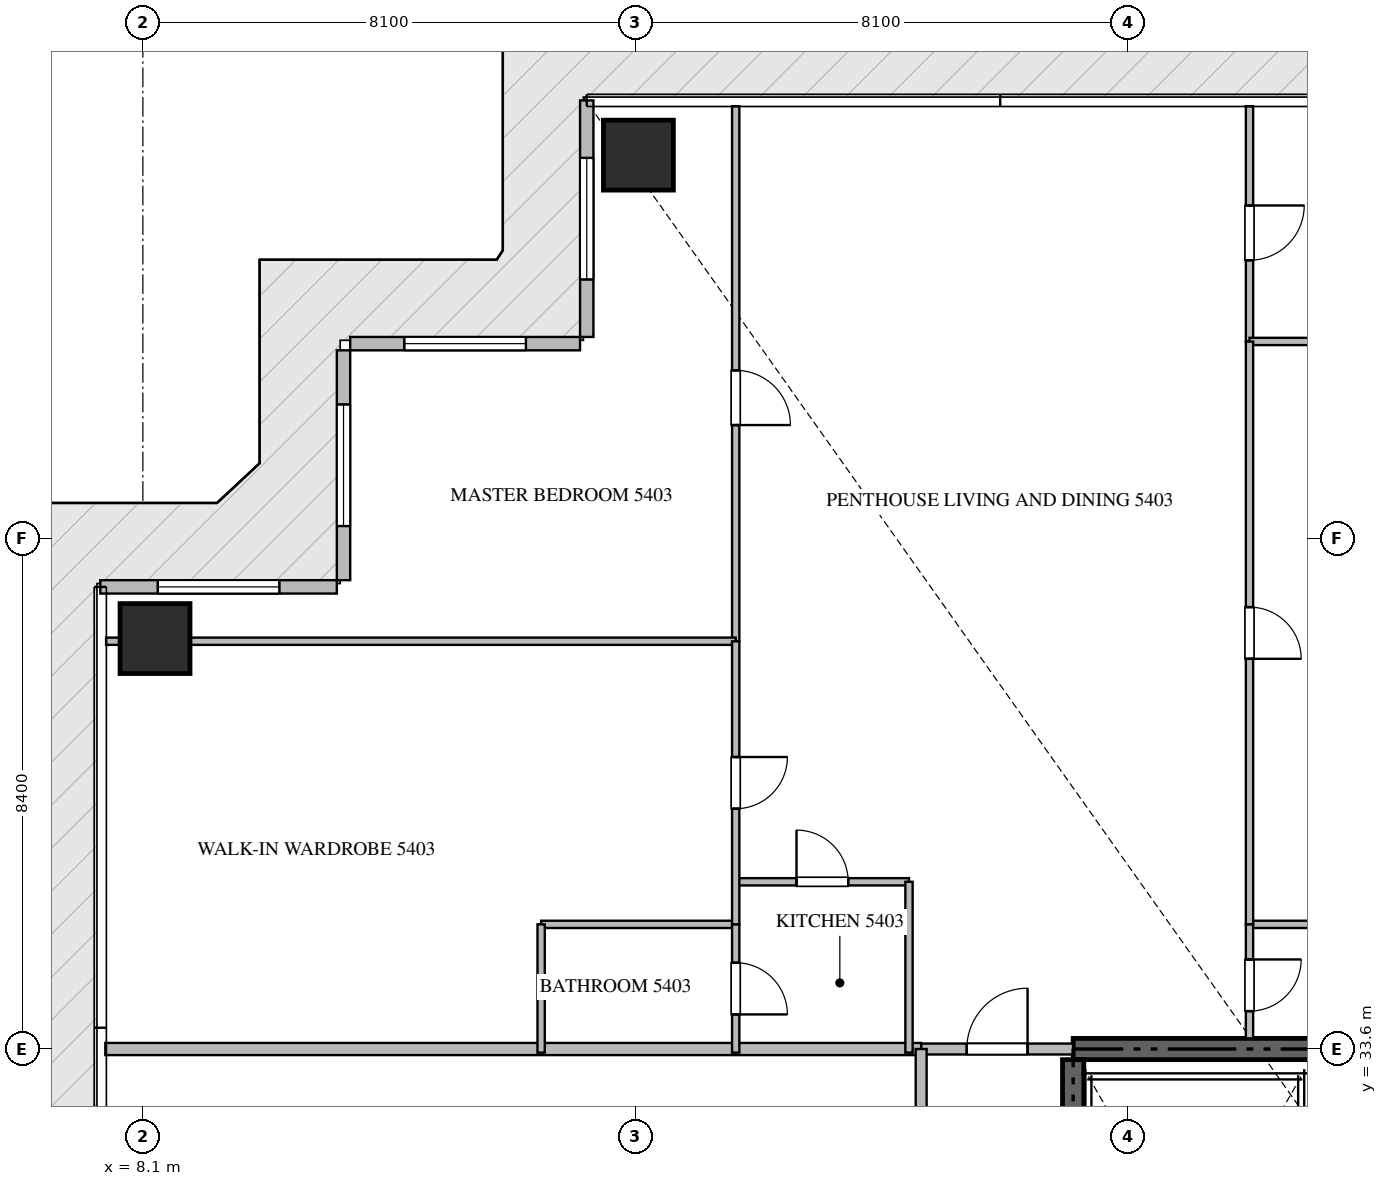
"""IFC4 building model, lengths in metres.
Left out: names, types, materials, properties, quantities, classifications, styles, units other than length and angle.
Written with IfcOpenShell. Run it as: python <this file> out.ifc"""

import sys

from ifc_helpers import new_model, si_unit, direction, frame, frame_2d, origin, origin_2d, place, context, subcontext, project, spatial, rectangle, extrude, source, transform, mapped, element, fill, save


model = new_model("IFC4")
c1 = context("Model", 3, precision=1e-05, world=origin(), true_north=direction((0.0, 1.0)))
c2 = subcontext(c1, "Body", "Model", "MODEL_VIEW")
j1 = project(units=[si_unit("LENGTHUNIT", "METRE"), si_unit("PLANEANGLEUNIT", "RADIAN")], contexts=[c1])
p1 = place(None, origin())
s1 = spatial("IfcSite", under=j1, at=p1, CompositionType="ELEMENT")
p2 = place(p1, origin())
s2 = spatial("IfcBuilding", under=s1, at=p2, CompositionType="ELEMENT")
p3 = place(p2, frame((0.0, 0.0, 218.15)))
s3 = spatial("IfcBuildingStorey", under=s2, at=p3, CompositionType="ELEMENT", Elevation=218.15)
p4 = place(p3, frame((41.4, 33.6, -0.26), z_axis=(0.0, 0.0, 1.0), x_axis=(-1.0, 0.0, 0.0)))
e1 = element("IfcWall", 1, at=p4, inside=s3, PredefinedType="SHEAR", context=c2, shape_type="SweptSolid", body=[
    extrude(rectangle(XDim=18.0, YDim=0.35, at=frame_2d((9.0, 0.0))), origin(), (0.0, 0.0, 1.0), 3.848),
])
p5 = place(p3, frame((23.4, 24.25, -0.26), z_axis=(0.0, 0.0, 1.0), x_axis=(0.0, 1.0, 0.0)))
e2 = element("IfcWall", 2, at=p5, inside=s3, PredefinedType="SHEAR", context=c2, shape_type="SweptSolid", body=[
    extrude(rectangle(XDim=9.175, YDim=0.35, at=frame_2d((4.587, 0.0))), origin(), (0.0, 0.0, 1.0), 3.848),
])
m1 = source(origin(), c2, "Body", "SweptSolid", [
    extrude(rectangle(XDim=1.15, YDim=1.15, at=origin_2d()), origin(), (0.0, 0.0, 1.0), 3.85),
])
for number, where, z_axis, x_axis in (
    (3, (16.25, 48.3, -0.26), (0.0, 0.0, 1.0), (1.0, 0.0, 0.0)),
    (4, (8.3, 40.35, -0.26), (0.0, 0.0, 1.0), (1.0, 0.0, 0.0)),
):
    element("IfcColumn", number, at=place(p3, frame(where, z_axis=z_axis, x_axis=x_axis)), inside=s3, PredefinedType="COLUMN", context=c2, shape_type="MappedRepresentation", body=[
        mapped(m1, transform((0.0, 0.0, 0.0), scale=1.0)),
    ])
p6 = place(p3, frame((15.4, 49.2, 0.0), z_axis=(0.0, 0.0, 1.0), x_axis=(0.0, -1.0, 0.0)))
e5 = element("IfcWall", 5, at=p6, inside=s3, PredefinedType="ELEMENTEDWALL", context=c2, shape_type="SweptSolid", body=[
    extrude(rectangle(XDim=3.89, YDim=0.22, at=frame_2d((1.945, 0.0))), origin(), (0.0, 0.0, 1.0), 3.575),
])
p7 = place(p6, frame((0.945, 0.0, 0.65)))
e6 = element("IfcOpeningElement", 6, at=p7, cuts=e5, PredefinedType="OPENING", context=c2, shape_type="SweptSolid", body=[
    extrude(rectangle(XDim=2.0, YDim=2.2, at=frame_2d((1.0, 1.1))), frame((0.0, 0.12, 0.0), z_axis=(0.0, -1.0, 0.0), x_axis=(1.0, 0.0, 0.0)), (0.0, 0.0, 1.0), 0.24),
])
p8 = place(p3, frame((15.29, 45.2, 0.0), z_axis=(0.0, 0.0, 1.0), x_axis=(-1.0, 0.0, 0.0)))
e7 = element("IfcWall", 7, at=p8, inside=s3, PredefinedType="ELEMENTEDWALL", context=c2, shape_type="SweptSolid", body=[
    extrude(rectangle(XDim=3.78, YDim=0.22, at=frame_2d((1.89, 0.0))), origin(), (0.0, 0.0, 1.0), 3.575),
])
p9 = place(p8, frame((0.89, 0.0, 0.65)))
e8 = element("IfcOpeningElement", 8, at=p9, cuts=e7, PredefinedType="OPENING", context=c2, shape_type="SweptSolid", body=[
    extrude(rectangle(XDim=2.0, YDim=2.2, at=frame_2d((1.0, 1.1))), frame((0.0, 0.12, 0.0), z_axis=(0.0, -1.0, 0.0), x_axis=(1.0, 0.0, 0.0)), (0.0, 0.0, 1.0), 0.24),
])
p10 = place(p3, frame((11.4, 45.09, 0.0), z_axis=(0.0, 0.0, 1.0), x_axis=(0.0, -1.0, 0.0)))
e9 = element("IfcWall", 9, at=p10, inside=s3, PredefinedType="ELEMENTEDWALL", context=c2, shape_type="SweptSolid", body=[
    extrude(rectangle(XDim=3.78, YDim=0.22, at=frame_2d((1.89, 0.0))), origin(), (0.0, 0.0, 1.0), 3.575),
])
p11 = place(p10, frame((0.89, 0.0, 0.65)))
e10 = element("IfcOpeningElement", 10, at=p11, cuts=e9, PredefinedType="OPENING", context=c2, shape_type="SweptSolid", body=[
    extrude(rectangle(XDim=2.0, YDim=2.2, at=frame_2d((1.0, 1.1))), frame((0.0, 0.12, 0.0), z_axis=(0.0, -1.0, 0.0), x_axis=(1.0, 0.0, 0.0)), (0.0, 0.0, 1.0), 0.24),
])
p12 = place(p3, frame((11.29, 41.2, 0.0), z_axis=(0.0, 0.0, 1.0), x_axis=(-1.0, 0.0, 0.0)))
e11 = element("IfcWall", 11, at=p12, inside=s3, PredefinedType="ELEMENTEDWALL", context=c2, shape_type="SweptSolid", body=[
    extrude(rectangle(XDim=3.89, YDim=0.22, at=frame_2d((1.945, 0.0))), origin(), (0.0, 0.0, 1.0), 3.575),
])
p13 = place(p12, frame((0.945, 0.0, 0.65)))
e12 = element("IfcOpeningElement", 12, at=p13, cuts=e11, PredefinedType="OPENING", context=c2, shape_type="SweptSolid", body=[
    extrude(rectangle(XDim=2.0, YDim=2.2, at=frame_2d((1.0, 1.1))), frame((0.0, 0.12, 0.0), z_axis=(0.0, -1.0, 0.0), x_axis=(1.0, 0.0, 0.0)), (0.0, 0.0, 1.0), 0.24),
])
p14 = place(p3, frame((7.482, 33.6, 0.0), z_axis=(0.0, 0.0, 1.0), x_axis=(1.0, 0.0, 0.0)))
e13 = element("IfcWall", 13, at=p14, inside=s3, PredefinedType="PARTITIONING", context=c2, shape_type="SweptSolid", body=[
    extrude(rectangle(XDim=13.418, YDim=0.2, at=frame_2d((6.709, 0.0))), origin(), (0.0, 0.0, 1.0), 3.59),
])
p15 = place(p3, frame((20.902, 33.6, 0.0), z_axis=(0.0, 0.0, 1.0), x_axis=(1.0, 0.0, 0.0)))
e14 = element("IfcWall", 14, at=p15, inside=s3, PredefinedType="PARTITIONING", context=c2, shape_type="SweptSolid", body=[
    extrude(rectangle(XDim=2.496, YDim=0.18, at=frame_2d((1.248, 0.0))), origin(), (0.0, 0.0, 1.0), 3.59),
])
p16 = place(p15, frame((0.748, 0.0, 0.0)))
e15 = element("IfcOpeningElement", 15, at=p16, cuts=e14, PredefinedType="OPENING", context=c2, shape_type="SweptSolid", body=[
    extrude(rectangle(XDim=1.0, YDim=2.15, at=frame_2d((0.5, 1.075))), frame((0.0, 0.1, 0.0), z_axis=(0.0, -1.0, 0.0), x_axis=(1.0, 0.0, 0.0)), (0.0, 0.0, 1.0), 0.2),
])
p17 = place(p3, frame((20.9, 16.8, 0.0), z_axis=(0.0, 0.0, 1.0), x_axis=(0.0, 1.0, 0.0)))
e16 = element("IfcWall", 16, at=p17, inside=s3, PredefinedType="PARTITIONING", context=c2, shape_type="SweptSolid", body=[
    extrude(rectangle(XDim=16.8, YDim=0.18, at=frame_2d((8.4, 0.0))), origin(), (0.0, 0.0, 1.0), 3.59),
])
p18 = place(p17, frame((14.5, 0.0, 0.0)))
e17 = element("IfcOpeningElement", 17, at=p18, cuts=e16, PredefinedType="OPENING", context=c2, shape_type="SweptSolid", body=[
    extrude(rectangle(XDim=1.0, YDim=2.15, at=frame_2d((0.5, 1.075))), frame((0.0, 0.1, 0.0), z_axis=(0.0, -1.0, 0.0), x_axis=(1.0, 0.0, 0.0)), (0.0, 0.0, 1.0), 0.2),
])
p19 = place(p3, frame((17.85, 36.35, 0.0), z_axis=(0.0, 0.0, 1.0), x_axis=(1.0, 0.0, 0.0)))
e18 = element("IfcWall", 18, at=p19, inside=s3, PredefinedType="PARTITIONING", context=c2, shape_type="SweptSolid", body=[
    extrude(rectangle(XDim=2.85, YDim=0.12, at=frame_2d((1.425, 0.0))), origin(), (0.0, 0.0, 1.0), 3.59),
])
p20 = place(p19, frame((1.0, 0.0, 0.0)))
e19 = element("IfcOpeningElement", 19, at=p20, cuts=e18, PredefinedType="OPENING", context=c2, shape_type="SweptSolid", body=[
    extrude(rectangle(XDim=0.85, YDim=2.1, at=frame_2d((0.425, 1.05))), frame((0.0, 0.07, 0.0), z_axis=(0.0, -1.0, 0.0), x_axis=(1.0, 0.0, 0.0)), (0.0, 0.0, 1.0), 0.14),
])
p21 = place(p3, frame((20.7, 36.35, 0.0), z_axis=(0.0, 0.0, 1.0), x_axis=(0.0, -1.0, 0.0)))
e20 = element("IfcWall", 20, at=p21, inside=s3, PredefinedType="PARTITIONING", context=c2, shape_type="SweptSolid", body=[
    extrude(rectangle(XDim=2.81, YDim=0.12, at=frame_2d((1.405, 0.0))), origin(), (0.0, 0.0, 1.0), 3.59),
])
p22 = place(p3, frame((17.85, 49.105, 0.0), z_axis=(0.0, 0.0, 1.0), x_axis=(0.0, -1.0, 0.0)))
e21 = element("IfcWall", 21, at=p22, inside=s3, PredefinedType="PARTITIONING", context=c2, shape_type="SweptSolid", body=[
    extrude(rectangle(XDim=8.799, YDim=0.12, at=frame_2d((4.399, 0.0))), origin(), (0.0, 0.0, 1.0), 3.59),
])
p23 = place(p22, frame((4.344, 0.0, 0.0)))
e22 = element("IfcOpeningElement", 22, at=p23, cuts=e21, PredefinedType="OPENING", context=c2, shape_type="SweptSolid", body=[
    extrude(rectangle(XDim=0.9, YDim=2.1, at=frame_2d((0.45, 1.05))), frame((0.0, 0.07, 0.0), z_axis=(0.0, -1.0, 0.0), x_axis=(1.0, 0.0, 0.0)), (0.0, 0.0, 1.0), 0.14),
])
p24 = place(p3, frame((7.495, 40.306, 0.0), z_axis=(0.0, 0.0, 1.0), x_axis=(1.0, 0.0, 0.0)))
e23 = element("IfcWall", 23, at=p24, inside=s3, PredefinedType="PARTITIONING", context=c2, shape_type="SweptSolid", body=[
    extrude(rectangle(XDim=10.355, YDim=0.12, at=frame_2d((5.177, 0.0))), origin(), (0.0, 0.0, 1.0), 3.122),
])
p25 = place(p3, frame((14.65, 35.65, 0.0), z_axis=(0.0, 0.0, 1.0), x_axis=(1.0, 0.0, 0.0)))
e24 = element("IfcWall", 24, at=p25, inside=s3, PredefinedType="PARTITIONING", context=c2, shape_type="SweptSolid", body=[
    extrude(rectangle(XDim=3.2, YDim=0.12, at=frame_2d((1.6, 0.0))), origin(), (0.0, 0.0, 1.0), 3.59),
])
p26 = place(p3, frame((14.65, 35.65, 0.0), z_axis=(0.0, 0.0, 1.0), x_axis=(0.0, -1.0, 0.0)))
e25 = element("IfcWall", 25, at=p26, inside=s3, PredefinedType="PARTITIONING", context=c2, shape_type="SweptSolid", body=[
    extrude(rectangle(XDim=2.11, YDim=0.12, at=frame_2d((1.055, 0.0))), origin(), (0.0, 0.0, 1.0), 3.59),
])
p27 = place(p3, frame((17.85, 40.304, 0.0), z_axis=(0.0, 0.0, 1.0), x_axis=(0.0, -1.0, 0.0)))
e26 = element("IfcWall", 26, at=p27, inside=s3, PredefinedType="PARTITIONING", context=c2, shape_type="SweptSolid", body=[
    extrude(rectangle(XDim=4.654, YDim=0.12, at=frame_2d((2.327, 0.0))), origin(), (0.0, 0.0, 1.0), 3.59),
])
p28 = place(p27, frame((1.902, 0.0, 0.0)))
e27 = element("IfcOpeningElement", 27, at=p28, cuts=e26, PredefinedType="OPENING", context=c2, shape_type="SweptSolid", body=[
    extrude(rectangle(XDim=0.85, YDim=2.1, at=frame_2d((0.425, 1.05))), frame((0.0, 0.07, 0.0), z_axis=(0.0, -1.0, 0.0), x_axis=(1.0, 0.0, 0.0)), (0.0, 0.0, 1.0), 0.14),
])
p29 = place(p3, frame((17.85, 35.648, 0.0), z_axis=(0.0, 0.0, 1.0), x_axis=(0.0, -1.0, 0.0)))
e28 = element("IfcWall", 28, at=p29, inside=s3, PredefinedType="PARTITIONING", context=c2, shape_type="SweptSolid", body=[
    extrude(rectangle(XDim=2.108, YDim=0.12, at=frame_2d((1.054, 0.0))), origin(), (0.0, 0.0, 1.0), 3.59),
])
p30 = place(p29, frame((0.629, 0.0, 0.0)))
e29 = element("IfcOpeningElement", 29, at=p30, cuts=e28, PredefinedType="OPENING", context=c2, shape_type="SweptSolid", body=[
    extrude(rectangle(XDim=0.85, YDim=2.1, at=frame_2d((0.425, 1.05))), frame((0.0, 0.07, 0.0), z_axis=(0.0, -1.0, 0.0), x_axis=(1.0, 0.0, 0.0)), (0.0, 0.0, 1.0), 0.14),
])
p31 = place(p3, frame((26.3, 49.105, 0.0), z_axis=(0.0, 0.0, 1.0), x_axis=(0.0, -1.0, 0.0)))
e30 = element("IfcWall", 30, at=p31, inside=s3, PredefinedType="PARTITIONING", context=c2, shape_type="SweptSolid", body=[
    extrude(rectangle(XDim=3.869, YDim=0.12, at=frame_2d((1.935, 0.0))), origin(), (0.0, 0.0, 1.0), 3.59),
])
p32 = place(p31, frame((1.633, 0.0, 0.0)))
e31 = element("IfcOpeningElement", 31, at=p32, cuts=e30, PredefinedType="OPENING", context=c2, shape_type="SweptSolid", body=[
    extrude(rectangle(XDim=0.9, YDim=2.1, at=frame_2d((0.45, 1.05))), frame((0.0, 0.07, 0.0), z_axis=(0.0, -1.0, 0.0), x_axis=(1.0, 0.0, 0.0)), (0.0, 0.0, 1.0), 0.14),
])
for number, where, z_axis, x_axis in (
    (32, (26.3, 45.236, 0.0), (0.0, 0.0, 1.0), (1.0, 0.0, 0.0)),
    (33, (26.3, 35.65, 0.0), (0.0, 0.0, 1.0), (1.0, 0.0, 0.0)),
):
    element("IfcWall", number, at=place(p3, frame(where, z_axis=z_axis, x_axis=x_axis)), inside=s3, PredefinedType="PARTITIONING", context=c2, shape_type="SweptSolid", body=[
        extrude(rectangle(XDim=9.06, YDim=0.12, at=frame_2d((4.53, 0.0))), origin(), (0.0, 0.0, 1.0), 3.59),
    ])
p33 = place(p3, frame((26.3, 45.234, 0.0), z_axis=(0.0, 0.0, 1.0), x_axis=(0.0, -1.0, 0.0)))
e34 = element("IfcWall", 34, at=p33, inside=s3, PredefinedType="PARTITIONING", context=c2, shape_type="SweptSolid", body=[
    extrude(rectangle(XDim=9.584, YDim=0.12, at=frame_2d((4.792, 0.0))), origin(), (0.0, 0.0, 1.0), 3.59),
])
p34 = place(p33, frame((4.367, 0.0, 0.0)))
e35 = element("IfcOpeningElement", 35, at=p34, cuts=e34, PredefinedType="OPENING", context=c2, shape_type="SweptSolid", body=[
    extrude(rectangle(XDim=0.85, YDim=2.1, at=frame_2d((0.425, 1.05))), frame((0.0, 0.07, 0.0), z_axis=(0.0, -1.0, 0.0), x_axis=(1.0, 0.0, 0.0)), (0.0, 0.0, 1.0), 0.14),
])
p35 = place(p3, frame((26.3, 35.648, 0.0), z_axis=(0.0, 0.0, 1.0), x_axis=(0.0, -1.0, 0.0)))
e36 = element("IfcWall", 36, at=p35, inside=s3, PredefinedType="PARTITIONING", context=c2, shape_type="SweptSolid", body=[
    extrude(rectangle(XDim=1.873, YDim=0.12, at=frame_2d((0.937, 0.0))), origin(), (0.0, 0.0, 1.0), 3.59),
])
p36 = place(p35, frame((0.575, 0.0, 0.0)))
e37 = element("IfcOpeningElement", 37, at=p36, cuts=e36, PredefinedType="OPENING", context=c2, shape_type="SweptSolid", body=[
    extrude(rectangle(XDim=0.85, YDim=2.1, at=frame_2d((0.425, 1.05))), frame((0.0, 0.07, 0.0), z_axis=(0.0, -1.0, 0.0), x_axis=(1.0, 0.0, 0.0)), (0.0, 0.0, 1.0), 0.14),
])
m2 = source(origin(), c2, "Body", "SweptSolid", [
    extrude(rectangle(XDim=2.0, YDim=2.2, at=frame_2d((1.0, 1.1))), frame((0.0, 0.03, 0.0), z_axis=(0.0, -1.0, 0.0), x_axis=(1.0, 0.0, 0.0)), (0.0, 0.0, 1.0), 0.06),
])
p37 = place(p7, origin())
e38 = element("IfcWindow", 38, at=p37, inside=s3, PartitioningType="SINGLE_PANEL", PredefinedType="WINDOW", context=c2, shape_type="MappedRepresentation", body=[
    mapped(m2, transform((0.0, 0.0, 0.0), scale=1.0)),
])
fill(e6, e38)
p38 = place(p9, origin())
e39 = element("IfcWindow", 39, at=p38, inside=s3, PartitioningType="SINGLE_PANEL", PredefinedType="WINDOW", context=c2, shape_type="MappedRepresentation", body=[
    mapped(m2, transform((0.0, 0.0, 0.0), scale=1.0)),
])
fill(e8, e39)
p39 = place(p11, origin())
e40 = element("IfcWindow", 40, at=p39, inside=s3, PartitioningType="SINGLE_PANEL", PredefinedType="WINDOW", context=c2, shape_type="MappedRepresentation", body=[
    mapped(m2, transform((0.0, 0.0, 0.0), scale=1.0)),
])
fill(e10, e40)
p40 = place(p13, origin())
e41 = element("IfcWindow", 41, at=p40, inside=s3, PartitioningType="SINGLE_PANEL", PredefinedType="WINDOW", context=c2, shape_type="MappedRepresentation", body=[
    mapped(m2, transform((0.0, 0.0, 0.0), scale=1.0)),
])
fill(e12, e41)
m3 = source(origin(), c2, "Body", "SweptSolid", [
    extrude(rectangle(XDim=1.0, YDim=2.15, at=frame_2d((0.5, 1.075))), frame((0.0, 0.025, 0.0), z_axis=(0.0, -1.0, 0.0), x_axis=(1.0, 0.0, 0.0)), (0.0, 0.0, 1.0), 0.05),
])
p41 = place(p16, origin())
e42 = element("IfcDoor", 42, at=p41, inside=s3, OperationType="SINGLE_SWING_RIGHT", PredefinedType="DOOR", context=c2, shape_type="MappedRepresentation", body=[
    mapped(m3, transform((0.0, 0.0, 0.0), scale=1.0)),
])
fill(e15, e42)
m4 = source(origin(), c2, "Body", "SweptSolid", [
    extrude(rectangle(XDim=0.85, YDim=2.1, at=frame_2d((0.425, 1.05))), frame((0.0, 0.025, 0.0), z_axis=(0.0, -1.0, 0.0), x_axis=(1.0, 0.0, 0.0)), (0.0, 0.0, 1.0), 0.05),
])
p42 = place(p20, origin())
e43 = element("IfcDoor", 43, at=p42, inside=s3, OperationType="SINGLE_SWING_LEFT", PredefinedType="DOOR", context=c2, shape_type="MappedRepresentation", body=[
    mapped(m4, transform((0.0, 0.0, 0.0), scale=1.0)),
])
fill(e19, e43)
m5 = source(origin(), c2, "Body", "SweptSolid", [
    extrude(rectangle(XDim=0.9, YDim=2.1, at=frame_2d((0.45, 1.05))), frame((0.0, 0.025, 0.0), z_axis=(0.0, -1.0, 0.0), x_axis=(1.0, 0.0, 0.0)), (0.0, 0.0, 1.0), 0.05),
])
p43 = place(p23, origin())
e44 = element("IfcDoor", 44, at=p43, inside=s3, OperationType="SINGLE_SWING_RIGHT", PredefinedType="DOOR", context=c2, shape_type="MappedRepresentation", body=[
    mapped(m5, transform((0.0, 0.0, 0.0), scale=1.0)),
])
fill(e22, e44)
p44 = place(p28, origin())
e45 = element("IfcDoor", 45, at=p44, inside=s3, OperationType="SINGLE_SWING_LEFT", PredefinedType="DOOR", context=c2, shape_type="MappedRepresentation", body=[
    mapped(m4, transform((0.0, 0.0, 0.0), scale=1.0)),
])
fill(e27, e45)
p45 = place(p30, origin())
e46 = element("IfcDoor", 46, at=p45, inside=s3, OperationType="SINGLE_SWING_RIGHT", PredefinedType="DOOR", context=c2, shape_type="MappedRepresentation", body=[
    mapped(m4, transform((0.0, 0.0, 0.0), scale=1.0)),
])
fill(e29, e46)
p46 = place(p32, origin())
e47 = element("IfcDoor", 47, at=p46, inside=s3, OperationType="SINGLE_SWING_LEFT", PredefinedType="DOOR", context=c2, shape_type="MappedRepresentation", body=[
    mapped(m5, transform((0.0, 0.0, 0.0), scale=1.0)),
])
fill(e31, e47)
p47 = place(p34, origin())
e48 = element("IfcDoor", 48, at=p47, inside=s3, OperationType="SINGLE_SWING_RIGHT", PredefinedType="DOOR", context=c2, shape_type="MappedRepresentation", body=[
    mapped(m4, transform((0.0, 0.0, 0.0), scale=1.0)),
])
fill(e35, e48)
p48 = place(p36, origin())
e49 = element("IfcDoor", 49, at=p48, inside=s3, OperationType="SINGLE_SWING_LEFT", PredefinedType="DOOR", context=c2, shape_type="MappedRepresentation", body=[
    mapped(m4, transform((0.0, 0.0, 0.0), scale=1.0)),
])
fill(e37, e49)
save(model, sys.argv[1])
